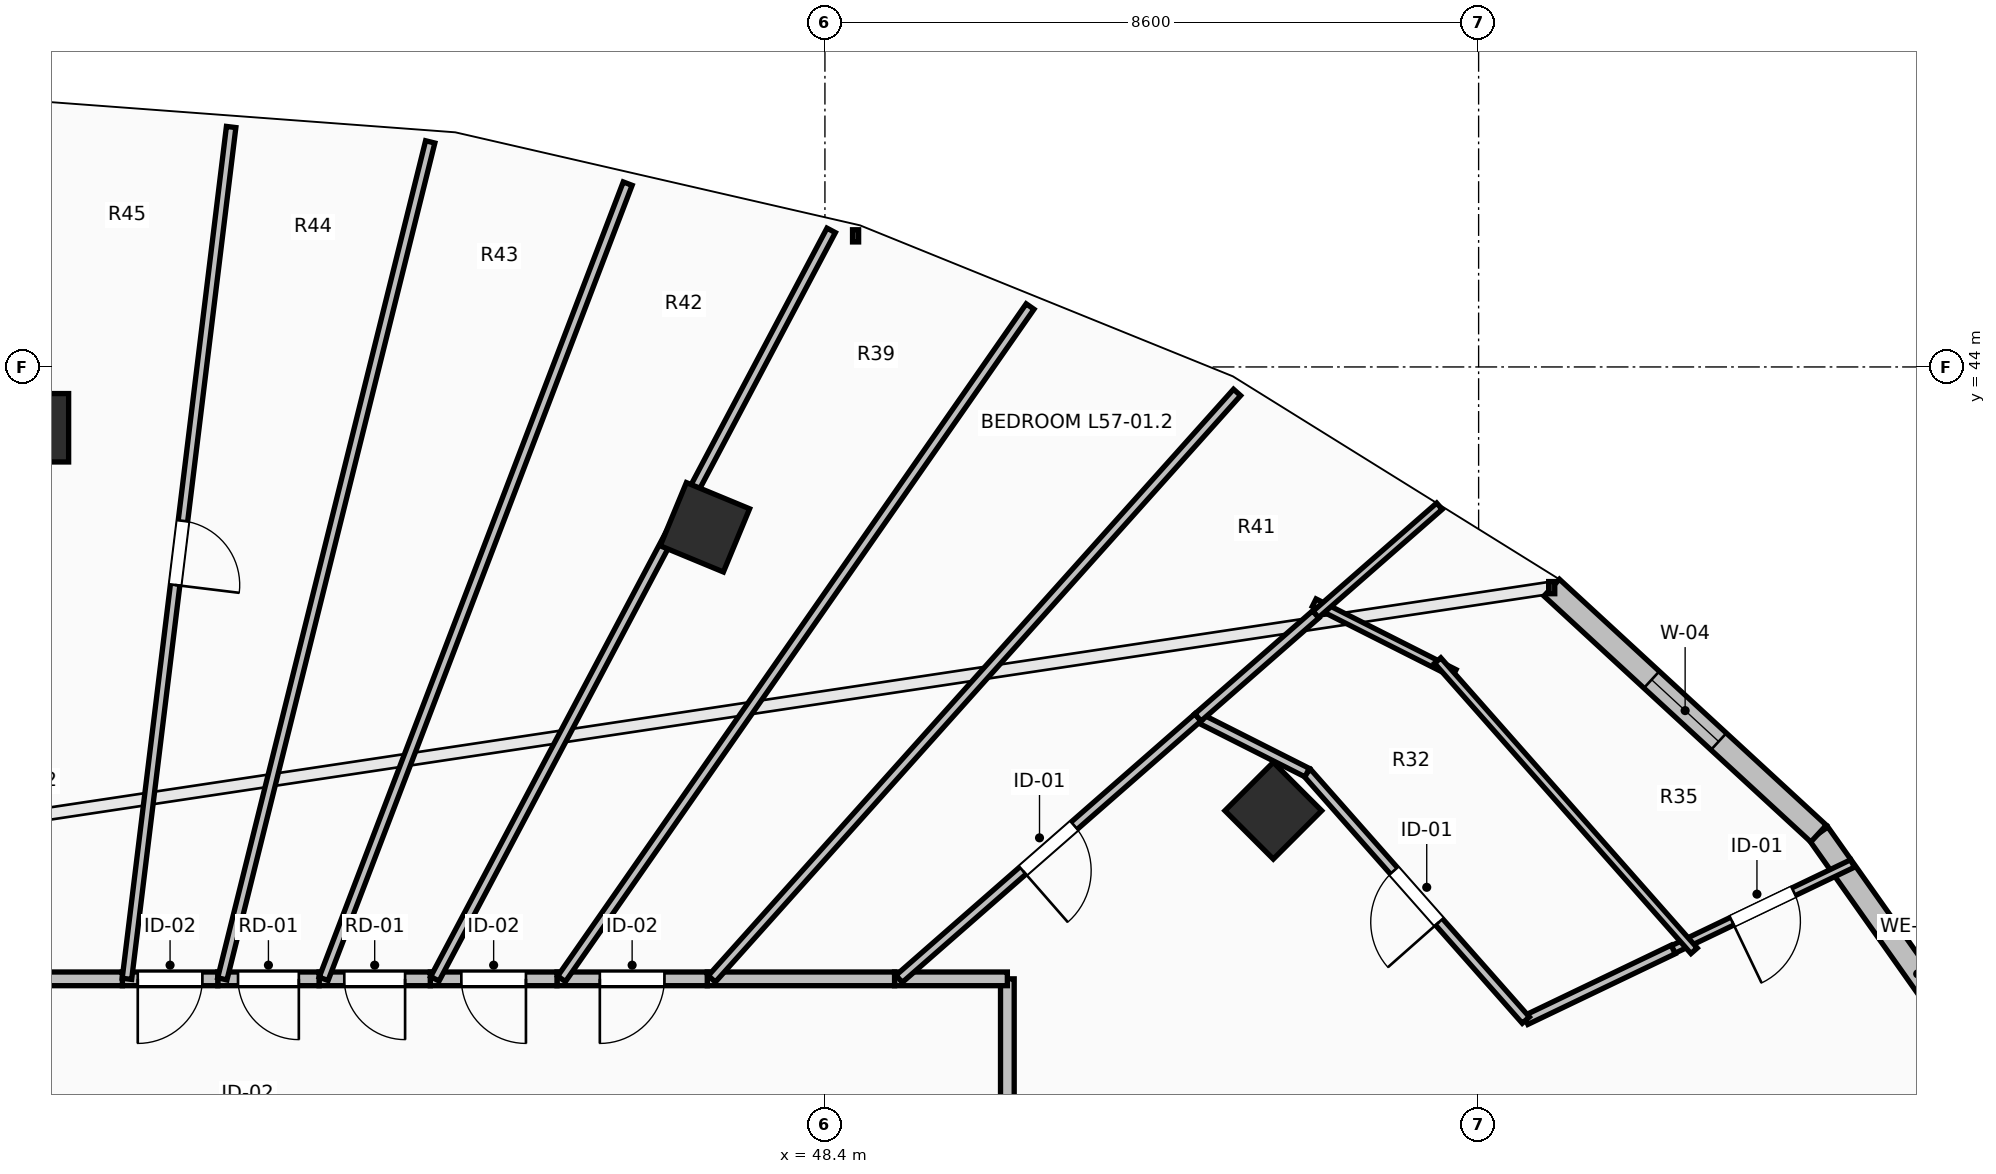
"""IFC4 building model, lengths in metres.
Left out: names, types, materials, properties, quantities, classifications, styles, units other than length and angle.
Written with IfcOpenShell. Run it as: python <this file> out.ifc"""

import sys

from ifc_helpers import new_model, si_unit, direction, frame, frame_2d, origin, origin_2d, place, context, subcontext, project, spatial, rectangle, extrude, element, fill, save


model = new_model("IFC4")
c1 = context("Model", 3, precision=1e-05, world=origin(), true_north=direction((0.0, 1.0)))
c2 = subcontext(c1, "Body", "Model", "MODEL_VIEW")
j1 = project(units=[si_unit("LENGTHUNIT", "METRE"), si_unit("PLANEANGLEUNIT", "RADIAN")], contexts=[c1])
p1 = place(None, origin())
s1 = spatial("IfcSite", under=j1, at=p1, CompositionType="ELEMENT")
p2 = place(p1, origin())
s2 = spatial("IfcBuilding", under=s1, at=p2, CompositionType="ELEMENT")
p3 = place(p2, frame((0.0, 0.0, 210.75)))
s3 = spatial("IfcBuildingStorey", under=s2, at=p3, CompositionType="ELEMENT", Elevation=210.75)
for number, where, z_axis, x_axis in (
    (1, (54.299, 38.162, 0.0), (0.0, 0.0, 1.0), (0.707, 0.707, 0.0)),
    (2, (46.821, 41.891, 0.0), (0.0, 0.0, 1.0), (0.383, 0.924, 0.0)),
    (3, (38.0, 43.2, 0.0), (0.0, 0.0, 1.0), (0.0, 1.0, 0.0)),
):
    element("IfcColumn", number, at=place(p3, frame(where, z_axis=z_axis, x_axis=x_axis)), inside=s3, PredefinedType="COLUMN", context=c2, shape_type="SweptSolid", body=[
        extrude(rectangle(XDim=0.9, YDim=0.9, at=origin_2d()), origin(), (0.0, 0.0, 1.0), 3.55),
    ])
p4 = place(p3, frame((64.081, 34.17, 0.0), z_axis=(0.0, 0.0, 1.0), x_axis=(-0.577168747264, 0.81662490605, 0.0)))
e4 = element("IfcWall", 4, at=p4, inside=s3, PredefinedType="STANDARD", context=c2, shape_type="SweptSolid", body=[
    extrude(rectangle(XDim=4.52, YDim=0.3, at=frame_2d((2.26, 0.0))), origin(), (0.0, 0.0, 1.0), 3.29),
])
p5 = place(p3, frame((61.472, 37.861, 0.0), z_axis=(0.0, 0.0, 1.0), x_axis=(-0.735359993374, 0.677676678177, 0.0)))
e5 = element("IfcWall", 5, at=p5, inside=s3, PredefinedType="STANDARD", context=c2, shape_type="SweptSolid", body=[
    extrude(rectangle(XDim=4.774, YDim=0.3, at=frame_2d((2.387, 0.0))), origin(), (0.0, 0.0, 1.0), 3.29),
])
p6 = place(p5, frame((1.787, 0.0, 0.85)))
e6 = element("IfcOpeningElement", 6, at=p6, cuts=e5, PredefinedType="OPENING", context=c2, shape_type="SweptSolid", body=[
    extrude(rectangle(XDim=1.2, YDim=2.1, at=frame_2d((0.6, 1.05))), frame((0.0, 0.165, 0.0), z_axis=(0.0, -1.0, 0.0), x_axis=(1.0, 0.0, 0.0)), (0.0, 0.0, 1.0), 0.33),
])
p7 = place(p3, frame((50.8, 31.751, 0.0), z_axis=(0.0, 0.0, 1.0), x_axis=(0.0, 1.0, 0.0)))
e7 = element("IfcWall", 7, at=p7, inside=s3, PredefinedType="PARTITIONING", context=c2, shape_type="SweptSolid", body=[
    extrude(rectangle(XDim=4.199, YDim=0.18, at=frame_2d((2.1, 0.0))), origin(), (0.0, 0.0, 1.0), 2.482),
])
p8 = place(p7, frame((1.6, 0.0, 0.0)))
e8 = element("IfcOpeningElement", 8, at=p8, cuts=e7, PredefinedType="OPENING", context=c2, shape_type="SweptSolid", body=[
    extrude(rectangle(XDim=1.0, YDim=2.15, at=frame_2d((0.5, 1.075))), frame((0.0, 0.105, 0.0), z_axis=(0.0, -1.0, 0.0), x_axis=(1.0, 0.0, 0.0)), (0.0, 0.0, 1.0), 0.21),
])
p9 = place(p3, frame((50.8, 35.95, 0.0), z_axis=(0.0, 0.0, 1.0), x_axis=(-1.0, 0.0, 0.0)))
e9 = element("IfcWall", 9, at=p9, inside=s3, PredefinedType="PARTITIONING", context=c2, shape_type="SweptSolid", body=[
    extrude(rectangle(XDim=1.484, YDim=0.18, at=frame_2d((0.742, 0.0))), origin(), (0.0, 0.0, 1.0), 3.29),
])
p10 = place(p3, frame((49.316, 35.95, 0.0), z_axis=(0.0, 0.0, 1.0), x_axis=(-1.0, 0.0, 0.0)))
e10 = element("IfcWall", 10, at=p10, inside=s3, PredefinedType="PARTITIONING", context=c2, shape_type="SweptSolid", body=[
    extrude(rectangle(XDim=2.464, YDim=0.18, at=frame_2d((1.232, 0.0))), origin(), (0.0, 0.0, 1.0), 2.482),
])
p11 = place(p3, frame((46.852, 35.95, 0.0), z_axis=(0.0, 0.0, 1.0), x_axis=(-1.0, 0.0, 0.0)))
e11 = element("IfcWall", 11, at=p11, inside=s3, PredefinedType="PARTITIONING", context=c2, shape_type="SweptSolid", body=[
    extrude(rectangle(XDim=1.977, YDim=0.18, at=frame_2d((0.989, 0.0))), origin(), (0.0, 0.0, 1.0), 2.979),
])
p12 = place(p11, frame((0.563, 0.0, 0.0)))
e12 = element("IfcOpeningElement", 12, at=p12, cuts=e11, PredefinedType="OPENING", context=c2, shape_type="SweptSolid", body=[
    extrude(rectangle(XDim=0.85, YDim=2.1, at=frame_2d((0.425, 1.05))), frame((0.0, 0.105, 0.0), z_axis=(0.0, -1.0, 0.0), x_axis=(1.0, 0.0, 0.0)), (0.0, 0.0, 1.0), 0.21),
])
p13 = place(p3, frame((44.875, 35.95, 0.0), z_axis=(0.0, 0.0, 1.0), x_axis=(-1.0, 0.0, 0.0)))
e13 = element("IfcWall", 13, at=p13, inside=s3, PredefinedType="PARTITIONING", context=c2, shape_type="SweptSolid", body=[
    extrude(rectangle(XDim=1.667, YDim=0.18, at=frame_2d((0.833, 0.0))), origin(), (0.0, 0.0, 1.0), 2.979),
])
p14 = place(p13, frame((0.408, 0.0, 0.0)))
e14 = element("IfcOpeningElement", 14, at=p14, cuts=e13, PredefinedType="OPENING", context=c2, shape_type="SweptSolid", body=[
    extrude(rectangle(XDim=0.85, YDim=2.1, at=frame_2d((0.425, 1.05))), frame((0.0, 0.105, 0.0), z_axis=(0.0, -1.0, 0.0), x_axis=(1.0, 0.0, 0.0)), (0.0, 0.0, 1.0), 0.21),
])
p15 = place(p3, frame((43.208, 35.95, 0.0), z_axis=(0.0, 0.0, 1.0), x_axis=(-1.0, 0.0, 0.0)))
e15 = element("IfcWall", 15, at=p15, inside=s3, PredefinedType="PARTITIONING", context=c2, shape_type="SweptSolid", body=[
    extrude(rectangle(XDim=1.463, YDim=0.18, at=frame_2d((0.731, 0.0))), origin(), (0.0, 0.0, 1.0), 2.979),
])
p16 = place(p15, frame((0.332, 0.0, 0.0)))
e16 = element("IfcOpeningElement", 16, at=p16, cuts=e15, PredefinedType="OPENING", context=c2, shape_type="SweptSolid", body=[
    extrude(rectangle(XDim=0.8, YDim=2.05, at=frame_2d((0.4, 1.025))), frame((0.0, 0.105, 0.0), z_axis=(0.0, -1.0, 0.0), x_axis=(1.0, 0.0, 0.0)), (0.0, 0.0, 1.0), 0.21),
])
p17 = place(p3, frame((41.745, 35.95, 0.0), z_axis=(0.0, 0.0, 1.0), x_axis=(-1.0, 0.0, 0.0)))
e17 = element("IfcWall", 17, at=p17, inside=s3, PredefinedType="PARTITIONING", context=c2, shape_type="SweptSolid", body=[
    extrude(rectangle(XDim=1.333, YDim=0.18, at=frame_2d((0.667, 0.0))), origin(), (0.0, 0.0, 1.0), 2.979),
])
p18 = place(p17, frame((0.267, 0.0, 0.0)))
e18 = element("IfcOpeningElement", 18, at=p18, cuts=e17, PredefinedType="OPENING", context=c2, shape_type="SweptSolid", body=[
    extrude(rectangle(XDim=0.8, YDim=2.05, at=frame_2d((0.4, 1.025))), frame((0.0, 0.105, 0.0), z_axis=(0.0, -1.0, 0.0), x_axis=(1.0, 0.0, 0.0)), (0.0, 0.0, 1.0), 0.21),
])
p19 = place(p3, frame((40.412, 35.95, 0.0), z_axis=(0.0, 0.0, 1.0), x_axis=(-1.0, 0.0, 0.0)))
e19 = element("IfcWall", 19, at=p19, inside=s3, PredefinedType="PARTITIONING", context=c2, shape_type="SweptSolid", body=[
    extrude(rectangle(XDim=1.255, YDim=0.18, at=frame_2d((0.627, 0.0))), origin(), (0.0, 0.0, 1.0), 2.979),
])
p20 = place(p19, frame((0.202, 0.0, 0.0)))
e20 = element("IfcOpeningElement", 20, at=p20, cuts=e19, PredefinedType="OPENING", context=c2, shape_type="SweptSolid", body=[
    extrude(rectangle(XDim=0.85, YDim=2.1, at=frame_2d((0.425, 1.05))), frame((0.0, 0.105, 0.0), z_axis=(0.0, -1.0, 0.0), x_axis=(1.0, 0.0, 0.0)), (0.0, 0.0, 1.0), 0.21),
])
p21 = place(p3, frame((39.157, 35.95, 0.0), z_axis=(0.0, 0.0, 1.0), x_axis=(-1.0, 0.0, 0.0)))
e21 = element("IfcWall", 21, at=p21, inside=s3, PredefinedType="PARTITIONING", context=c2, shape_type="SweptSolid", body=[
    extrude(rectangle(XDim=1.217, YDim=0.18, at=frame_2d((0.608, 0.0))), origin(), (0.0, 0.0, 1.0), 2.979),
])
p22 = place(p3, frame((61.919, 37.468, 0.0), z_axis=(0.0, 0.0, 1.0), x_axis=(-0.901731167672, -0.432297237151, 0.0)))
e22 = element("IfcWall", 22, at=p22, inside=s3, PredefinedType="PARTITIONING", context=c2, shape_type="SweptSolid", body=[
    extrude(rectangle(XDim=2.616, YDim=0.11, at=frame_2d((1.308, 0.0))), origin(), (0.0, 0.0, 1.0), 3.29),
])
p23 = place(p22, frame((0.858, 0.0, 0.0)))
e23 = element("IfcOpeningElement", 23, at=p23, cuts=e22, PredefinedType="OPENING", context=c2, shape_type="SweptSolid", body=[
    extrude(rectangle(XDim=0.9, YDim=2.1, at=frame_2d((0.45, 1.05))), frame((0.0, 0.07, 0.0), z_axis=(0.0, -1.0, 0.0), x_axis=(1.0, 0.0, 0.0)), (0.0, 0.0, 1.0), 0.14),
])
p24 = place(p3, frame((59.56, 36.336, 0.0), z_axis=(0.0, 0.0, 1.0), x_axis=(-0.901730274491, -0.432299100238, 0.0)))
e24 = element("IfcWall", 24, at=p24, inside=s3, PredefinedType="PARTITIONING", context=c2, shape_type="SweptSolid", body=[
    extrude(rectangle(XDim=2.15, YDim=0.125, at=frame_2d((1.075, 0.0))), origin(), (0.0, 0.0, 1.0), 3.29),
])
p25 = place(p3, frame((57.621, 35.407, 0.0), z_axis=(0.0, 0.0, 1.0), x_axis=(-0.662160377652, 0.749362151612, 0.0)))
e25 = element("IfcWall", 25, at=p25, inside=s3, PredefinedType="PARTITIONING", context=c2, shape_type="SweptSolid", body=[
    extrude(rectangle(XDim=4.345, YDim=0.125, at=frame_2d((2.173, 0.0))), origin(), (0.0, 0.0, 1.0), 3.29),
])
p26 = place(p25, frame((1.722, 0.0, 0.0)))
e26 = element("IfcOpeningElement", 26, at=p26, cuts=e25, PredefinedType="OPENING", context=c2, shape_type="SweptSolid", body=[
    extrude(rectangle(XDim=0.9, YDim=2.1, at=frame_2d((0.45, 1.05))), frame((0.0, 0.077, 0.0), z_axis=(0.0, -1.0, 0.0), x_axis=(1.0, 0.0, 0.0)), (0.0, 0.0, 1.0), 0.155),
])
p27 = place(p3, frame((54.744, 38.663, 0.0), z_axis=(0.0, 0.0, 1.0), x_axis=(-0.892600010283, 0.450849444541, 0.0)))
e27 = element("IfcWall", 27, at=p27, inside=s3, PredefinedType="PARTITIONING", context=c2, shape_type="SweptSolid", body=[
    extrude(rectangle(XDim=1.61, YDim=0.125, at=frame_2d((0.805, 0.0))), origin(), (0.0, 0.0, 1.0), 3.29),
])
p28 = place(p3, frame((53.307, 39.389, 0.0), z_axis=(0.0, 0.0, 1.0), x_axis=(-0.752631709834, -0.658441728137, 0.0)))
e28 = element("IfcWall", 28, at=p28, inside=s3, PredefinedType="PARTITIONING", context=c2, shape_type="SweptSolid", body=[
    extrude(rectangle(XDim=5.223, YDim=0.125, at=frame_2d((2.611, 0.0))), origin(), (0.0, 0.0, 1.0), 2.824),
])
p29 = place(p28, frame((2.162, 0.0, 0.0)))
e29 = element("IfcOpeningElement", 29, at=p29, cuts=e28, PredefinedType="OPENING", context=c2, shape_type="SweptSolid", body=[
    extrude(rectangle(XDim=0.9, YDim=2.1, at=frame_2d((0.45, 1.05))), frame((0.0, 0.077, 0.0), z_axis=(0.0, -1.0, 0.0), x_axis=(1.0, 0.0, 0.0)), (0.0, 0.0, 1.0), 0.155),
])
p30 = place(p3, frame((54.837, 40.899, 0.0), z_axis=(0.0, 0.0, 1.0), x_axis=(0.892645505641, -0.450759360701, 0.0)))
e30 = element("IfcWall", 30, at=p30, inside=s3, PredefinedType="PARTITIONING", context=c2, shape_type="SweptSolid", body=[
    extrude(rectangle(XDim=2.063, YDim=0.11, at=frame_2d((1.032, 0.0))), origin(), (0.0, 0.0, 1.0), 3.29),
])
p31 = place(p3, frame((56.461, 40.137, 0.0), z_axis=(0.0, 0.0, 1.0), x_axis=(0.662153993881, -0.749367792467, 0.0)))
e31 = element("IfcWall", 31, at=p31, inside=s3, PredefinedType="PARTITIONING", context=c2, shape_type="SweptSolid", body=[
    extrude(rectangle(XDim=5.095, YDim=0.11, at=frame_2d((2.547, 0.0))), origin(), (0.0, 0.0, 1.0), 3.29),
])
p32 = place(p3, frame((56.484, 42.168, 0.0), z_axis=(0.0, 0.0, 1.0), x_axis=(-0.752555717051, -0.658528581562, 0.0)))
e32 = element("IfcWall", 32, at=p32, inside=s3, PredefinedType="PARTITIONING", context=c2, shape_type="SweptSolid", body=[
    extrude(rectangle(XDim=2.163, YDim=0.11, at=frame_2d((1.082, 0.0))), origin(), (0.0, 0.0, 1.0), 3.29),
])
p33 = place(p3, frame((54.856, 40.744, 0.0), z_axis=(0.0, 0.0, 1.0), x_axis=(-0.752679548168, -0.658387042528, 0.0)))
e33 = element("IfcWall", 33, at=p33, inside=s3, PredefinedType="PARTITIONING", context=c2, shape_type="SweptSolid", body=[
    extrude(rectangle(XDim=2.058, YDim=0.125, at=frame_2d((1.029, 0.0))), origin(), (0.0, 0.0, 1.0), 3.29),
])
p34 = place(p3, frame((53.822, 43.665, 0.0), z_axis=(0.0, 0.0, 1.0), x_axis=(-0.667166856079, -0.74490830721, 0.0)))
e34 = element("IfcWall", 34, at=p34, inside=s3, PredefinedType="PARTITIONING", context=c2, shape_type="SweptSolid", body=[
    extrude(rectangle(XDim=10.357, YDim=0.125, at=frame_2d((5.179, 0.0))), origin(), (0.0, 0.0, 1.0), 2.482),
])
p35 = place(p3, frame((51.099, 44.795, 0.0), z_axis=(0.0, 0.0, 1.0), x_axis=(-0.571754326018, -0.82042488424, 0.0)))
e35 = element("IfcWall", 35, at=p35, inside=s3, PredefinedType="PARTITIONING", context=c2, shape_type="SweptSolid", body=[
    extrude(rectangle(XDim=10.781, YDim=0.125, at=frame_2d((5.391, 0.0))), origin(), (0.0, 0.0, 1.0), 2.482),
])
p36 = place(p3, frame((48.482, 45.797, 0.0), z_axis=(0.0, 0.0, 1.0), x_axis=(-0.46793402924, -0.883763398359, 0.0)))
e36 = element("IfcWall", 36, at=p36, inside=s3, PredefinedType="PARTITIONING", context=c2, shape_type="SweptSolid", body=[
    extrude(rectangle(XDim=11.142, YDim=0.125, at=frame_2d((5.571, 0.0))), origin(), (0.0, 0.0, 1.0), 2.824),
])
p37 = place(p3, frame((45.805, 46.412, 0.0), z_axis=(0.0, 0.0, 1.0), x_axis=(-0.357119008819, -0.934058891901, 0.0)))
e37 = element("IfcWall", 37, at=p37, inside=s3, PredefinedType="PARTITIONING", context=c2, shape_type="SweptSolid", body=[
    extrude(rectangle(XDim=11.201, YDim=0.125, at=frame_2d((5.6, 0.0))), origin(), (0.0, 0.0, 1.0), 2.824),
])
p38 = place(p3, frame((43.207, 46.961, 0.0), z_axis=(0.0, 0.0, 1.0), x_axis=(-0.241072089133, -0.970507211638, 0.0)))
e38 = element("IfcWall", 38, at=p38, inside=s3, PredefinedType="PARTITIONING", context=c2, shape_type="SweptSolid", body=[
    extrude(rectangle(XDim=11.346, YDim=0.125, at=frame_2d((5.673, 0.0))), origin(), (0.0, 0.0, 1.0), 2.824),
])
p39 = place(p3, frame((40.588, 47.157, 0.0), z_axis=(0.0, 0.0, 1.0), x_axis=(-0.121415539359, -0.992601766471, 0.0)))
e39 = element("IfcWall", 39, at=p39, inside=s3, PredefinedType="PARTITIONING", context=c2, shape_type="SweptSolid", body=[
    extrude(rectangle(XDim=11.291, YDim=0.125, at=frame_2d((5.645, 0.0))), origin(), (0.0, 0.0, 1.0), 2.824),
])
p40 = place(p39, frame((5.22, 0.0, 0.0)))
e40 = element("IfcOpeningElement", 40, at=p40, cuts=e39, PredefinedType="OPENING", context=c2, shape_type="SweptSolid", body=[
    extrude(rectangle(XDim=0.85, YDim=2.1, at=frame_2d((0.425, 1.05))), frame((0.0, 0.077, 0.0), z_axis=(0.0, -1.0, 0.0), x_axis=(1.0, 0.0, 0.0)), (0.0, 0.0, 1.0), 0.155),
])
p41 = place(p6, origin())
e41 = element("IfcWindow", 41, at=p41, inside=s3, PartitioningType="SINGLE_PANEL", PredefinedType="WINDOW", context=c2, shape_type="SweptSolid", body=[
    extrude(rectangle(XDim=1.2, YDim=2.1, at=frame_2d((0.6, 1.05))), frame((0.0, 0.03, 0.0), z_axis=(0.0, -1.0, 0.0), x_axis=(1.0, 0.0, 0.0)), (0.0, 0.0, 1.0), 0.06),
])
fill(e6, e41)
p42 = place(p23, origin())
e42 = element("IfcDoor", 42, at=p42, inside=s3, OperationType="SINGLE_SWING_RIGHT", PredefinedType="DOOR", context=c2, shape_type="SweptSolid", body=[
    extrude(rectangle(XDim=0.9, YDim=2.1, at=frame_2d((0.45, 1.05))), frame((0.0, 0.025, 0.0), z_axis=(0.0, -1.0, 0.0), x_axis=(1.0, 0.0, 0.0)), (0.0, 0.0, 1.0), 0.05),
])
fill(e23, e42)
p43 = place(p26, origin())
e43 = element("IfcDoor", 43, at=p43, inside=s3, OperationType="SINGLE_SWING_LEFT", PredefinedType="DOOR", context=c2, shape_type="SweptSolid", body=[
    extrude(rectangle(XDim=0.9, YDim=2.1, at=frame_2d((0.45, 1.05))), frame((0.0, 0.025, 0.0), z_axis=(0.0, -1.0, 0.0), x_axis=(1.0, 0.0, 0.0)), (0.0, 0.0, 1.0), 0.05),
])
fill(e26, e43)
p44 = place(p29, origin())
e44 = element("IfcDoor", 44, at=p44, inside=s3, OperationType="SINGLE_SWING_RIGHT", PredefinedType="DOOR", context=c2, shape_type="SweptSolid", body=[
    extrude(rectangle(XDim=0.9, YDim=2.1, at=frame_2d((0.45, 1.05))), frame((0.0, 0.025, 0.0), z_axis=(0.0, -1.0, 0.0), x_axis=(1.0, 0.0, 0.0)), (0.0, 0.0, 1.0), 0.05),
])
fill(e29, e44)
p45 = place(p12, origin())
e45 = element("IfcDoor", 45, at=p45, inside=s3, OperationType="SINGLE_SWING_RIGHT", PredefinedType="DOOR", context=c2, shape_type="SweptSolid", body=[
    extrude(rectangle(XDim=0.85, YDim=2.1, at=frame_2d((0.425, 1.05))), frame((0.0, 0.025, 0.0), z_axis=(0.0, -1.0, 0.0), x_axis=(1.0, 0.0, 0.0)), (0.0, 0.0, 1.0), 0.05),
])
fill(e12, e45)
p46 = place(p14, origin())
e46 = element("IfcDoor", 46, at=p46, inside=s3, OperationType="SINGLE_SWING_LEFT", PredefinedType="DOOR", context=c2, shape_type="SweptSolid", body=[
    extrude(rectangle(XDim=0.85, YDim=2.1, at=frame_2d((0.425, 1.05))), frame((0.0, 0.025, 0.0), z_axis=(0.0, -1.0, 0.0), x_axis=(1.0, 0.0, 0.0)), (0.0, 0.0, 1.0), 0.05),
])
fill(e14, e46)
p47 = place(p16, origin())
e47 = element("IfcDoor", 47, at=p47, inside=s3, OperationType="SINGLE_SWING_LEFT", PredefinedType="DOOR", context=c2, shape_type="SweptSolid", body=[
    extrude(rectangle(XDim=0.8, YDim=2.05, at=frame_2d((0.4, 1.025))), frame((0.0, 0.025, 0.0), z_axis=(0.0, -1.0, 0.0), x_axis=(1.0, 0.0, 0.0)), (0.0, 0.0, 1.0), 0.05),
])
fill(e16, e47)
p48 = place(p18, origin())
e48 = element("IfcDoor", 48, at=p48, inside=s3, OperationType="SINGLE_SWING_LEFT", PredefinedType="DOOR", context=c2, shape_type="SweptSolid", body=[
    extrude(rectangle(XDim=0.8, YDim=2.05, at=frame_2d((0.4, 1.025))), frame((0.0, 0.025, 0.0), z_axis=(0.0, -1.0, 0.0), x_axis=(1.0, 0.0, 0.0)), (0.0, 0.0, 1.0), 0.05),
])
fill(e18, e48)
p49 = place(p20, origin())
e49 = element("IfcDoor", 49, at=p49, inside=s3, OperationType="SINGLE_SWING_RIGHT", PredefinedType="DOOR", context=c2, shape_type="SweptSolid", body=[
    extrude(rectangle(XDim=0.85, YDim=2.1, at=frame_2d((0.425, 1.05))), frame((0.0, 0.025, 0.0), z_axis=(0.0, -1.0, 0.0), x_axis=(1.0, 0.0, 0.0)), (0.0, 0.0, 1.0), 0.05),
])
fill(e20, e49)
p50 = place(p40, origin())
e50 = element("IfcDoor", 50, at=p50, inside=s3, OperationType="SINGLE_SWING_RIGHT", PredefinedType="DOOR", context=c2, shape_type="SweptSolid", body=[
    extrude(rectangle(XDim=0.85, YDim=2.1, at=frame_2d((0.425, 1.05))), frame((0.0, 0.025, 0.0), z_axis=(0.0, -1.0, 0.0), x_axis=(1.0, 0.0, 0.0)), (0.0, 0.0, 1.0), 0.05),
])
fill(e40, e50)
save(model, sys.argv[1])
